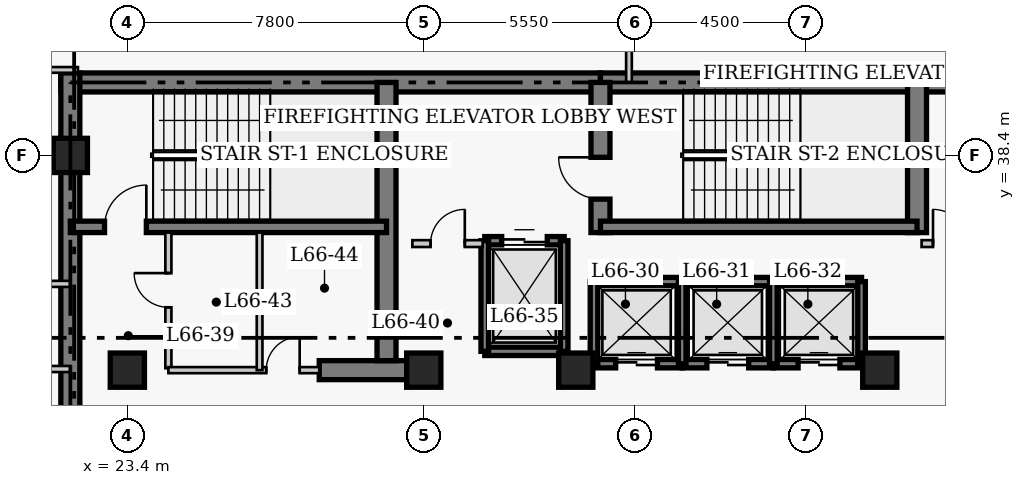
"""IFC4 building model, lengths in metres.
Left out: names, types, materials, properties, quantities, classifications, styles, units other than length and angle.
Written with IfcOpenShell. Run it as: python <this file> out.ifc"""

import sys

from ifc_helpers import new_model, si_unit, direction, frame, frame_2d, origin, origin_2d, place, context, subcontext, project, spatial, rectangle, extrude, element, fill, save


model = new_model("IFC4")
c1 = context("Model", 3, precision=1e-05, world=origin(), true_north=direction((0.0, 1.0)))
c2 = subcontext(c1, "Body", "Model", "MODEL_VIEW")
j1 = project(units=[si_unit("LENGTHUNIT", "METRE"), si_unit("PLANEANGLEUNIT", "RADIAN")], contexts=[c1])
p1 = place(None, origin())
s1 = spatial("IfcSite", under=j1, at=p1, CompositionType="ELEMENT")
p2 = place(p1, origin())
s2 = spatial("IfcBuilding", under=s1, at=p2, CompositionType="ELEMENT")
p3 = place(p2, frame((0.0, 0.0, 265.4)))
s3 = spatial("IfcBuildingStorey", under=s2, at=p3, CompositionType="ELEMENT", Elevation=265.4)
p4 = place(p3, frame((21.65, 40.32, 0.0), z_axis=(0.0, 0.0, 1.0), x_axis=(1.0, 0.0, 0.0)))
e1 = element("IfcWall", 1, at=p4, inside=s3, PredefinedType="SHEAR", context=c2, shape_type="SweptSolid", body=[
    extrude(rectangle(XDim=14.2, YDim=0.5, at=frame_2d((7.1, 0.0))), origin(), (0.0, 0.0, 1.0), 4.0),
])
p5 = place(p3, frame((35.85, 40.32, 0.0), z_axis=(0.0, 0.0, 1.0), x_axis=(1.0, 0.0, 0.0)))
e2 = element("IfcWall", 2, at=p5, inside=s3, PredefinedType="SHEAR", context=c2, shape_type="SweptSolid", body=[
    extrude(rectangle(XDim=12.6, YDim=0.5, at=frame_2d((6.3, 0.0))), origin(), (0.0, 0.0, 1.0), 4.0),
])
p6 = place(p3, frame((21.9, 27.05, 0.0), z_axis=(0.0, 0.0, 1.0), x_axis=(0.0, 1.0, 0.0)))
e3 = element("IfcWall", 3, at=p6, inside=s3, PredefinedType="SHEAR", context=c2, shape_type="SweptSolid", body=[
    extrude(rectangle(XDim=13.52, YDim=0.5, at=frame_2d((6.76, 0.0))), origin(), (0.0, 0.0, 1.0), 4.0),
])
p7 = place(p3, frame((28.45, 32.75, 0.0), z_axis=(0.0, 0.0, 1.0), x_axis=(1.0, 0.0, 0.0)))
e4 = element("IfcWall", 4, at=p7, inside=s3, PredefinedType="SHEAR", context=c2, shape_type="SweptSolid", body=[
    extrude(rectangle(XDim=2.4, YDim=0.5, at=frame_2d((1.2, 0.0))), origin(), (0.0, 0.0, 1.0), 4.0),
])
p8 = place(p3, frame((30.22, 33.0, 0.0), z_axis=(0.0, 0.0, 1.0), x_axis=(0.0, 1.0, 0.0)))
e5 = element("IfcWall", 5, at=p8, inside=s3, PredefinedType="SHEAR", context=c2, shape_type="SweptSolid", body=[
    extrude(rectangle(XDim=7.32, YDim=0.5, at=frame_2d((3.66, 0.0))), origin(), (0.0, 0.0, 1.0), 4.0),
])
p9 = place(p3, frame((35.85, 36.37, 0.0), z_axis=(0.0, 0.0, 1.0), x_axis=(0.0, 1.0, 0.0)))
e6 = element("IfcWall", 6, at=p9, inside=s3, PredefinedType="SHEAR", context=c2, shape_type="SweptSolid", body=[
    extrude(rectangle(XDim=3.95, YDim=0.5, at=frame_2d((1.975, 0.0))), origin(), (0.0, 0.0, 1.0), 4.0),
])
p10 = place(p9, frame((0.88, 0.0, 0.0)))
e7 = element("IfcOpeningElement", 7, at=p10, cuts=e6, PredefinedType="OPENING", context=c2, shape_type="SweptSolid", body=[
    extrude(rectangle(XDim=1.1, YDim=2.15, at=frame_2d((0.55, 1.075))), frame((0.0, 0.26, 0.0), z_axis=(0.0, -1.0, 0.0), x_axis=(1.0, 0.0, 0.0)), (0.0, 0.0, 1.0), 0.52),
])
p11 = place(p3, frame((44.18, 36.37, 0.0), z_axis=(0.0, 0.0, 1.0), x_axis=(0.0, 1.0, 0.0)))
e8 = element("IfcWall", 8, at=p11, inside=s3, PredefinedType="SHEAR", context=c2, shape_type="SweptSolid", body=[
    extrude(rectangle(XDim=3.95, YDim=0.5, at=frame_2d((1.975, 0.0))), origin(), (0.0, 0.0, 1.0), 4.0),
])
p12 = place(p3, frame((21.9, 36.52, 0.0), z_axis=(0.0, 0.0, 1.0), x_axis=(1.0, 0.0, 0.0)))
e9 = element("IfcWall", 9, at=p12, inside=s3, PredefinedType="SHEAR", context=c2, shape_type="SweptSolid", body=[
    extrude(rectangle(XDim=8.32, YDim=0.3, at=frame_2d((4.16, 0.0))), origin(), (0.0, 0.0, 1.0), 4.0),
])
p13 = place(p12, frame((0.9, 0.0, 0.0)))
e10 = element("IfcOpeningElement", 10, at=p13, cuts=e9, PredefinedType="OPENING", context=c2, shape_type="SweptSolid", body=[
    extrude(rectangle(XDim=1.1, YDim=2.15, at=frame_2d((0.55, 1.075))), frame((0.0, 0.16, 0.0), z_axis=(0.0, -1.0, 0.0), x_axis=(1.0, 0.0, 0.0)), (0.0, 0.0, 1.0), 0.32),
])
p14 = place(p3, frame((35.85, 36.52, 0.0), z_axis=(0.0, 0.0, 1.0), x_axis=(1.0, 0.0, 0.0)))
e11 = element("IfcWall", 11, at=p14, inside=s3, PredefinedType="SHEAR", context=c2, shape_type="SweptSolid", body=[
    extrude(rectangle(XDim=8.33, YDim=0.3, at=frame_2d((4.165, 0.0))), origin(), (0.0, 0.0, 1.0), 4.0),
])
for number, where, z_axis, x_axis in (
    (12, (21.9, 38.4, 0.0), (0.0, 0.0, 1.0), (1.0, 0.0, 0.0)),
    (13, (23.4, 32.75, 0.0), (0.0, 0.0, 1.0), (1.0, 0.0, 0.0)),
    (14, (31.2, 32.75, 0.0), (0.0, 0.0, 1.0), (1.0, 0.0, 0.0)),
    (15, (35.2, 32.75, 0.0), (0.0, 0.0, 1.0), (1.0, 0.0, 0.0)),
    (16, (43.2, 32.75, 0.0), (0.0, 0.0, 1.0), (1.0, 0.0, 0.0)),
):
    element("IfcColumn", number, at=place(p3, frame(where, z_axis=z_axis, x_axis=x_axis)), inside=s3, PredefinedType="COLUMN", context=c2, shape_type="SweptSolid", body=[
        extrude(rectangle(XDim=0.9, YDim=0.9, at=origin_2d()), origin(), (0.0, 0.0, 1.0), 4.0),
    ])
p15 = place(p3, frame((35.68, 35.08, 0.0), z_axis=(0.0, 0.0, 1.0), x_axis=(1.0, 0.0, 0.0)))
e17 = element("IfcWall", 17, at=p15, inside=s3, PredefinedType="SHEAR", context=c2, shape_type="SweptSolid", body=[
    extrude(rectangle(XDim=2.32, YDim=0.22, at=frame_2d((1.16, 0.0))), origin(), (0.0, 0.0, 1.0), 4.0),
])
p16 = place(p3, frame((35.68, 32.92, 0.0), z_axis=(0.0, 0.0, 1.0), x_axis=(1.0, 0.0, 0.0)))
e18 = element("IfcWall", 18, at=p16, inside=s3, PredefinedType="SHEAR", context=c2, shape_type="SweptSolid", body=[
    extrude(rectangle(XDim=2.32, YDim=0.22, at=frame_2d((1.16, 0.0))), origin(), (0.0, 0.0, 1.0), 4.0),
])
p17 = place(p16, frame((0.57, 0.0, 0.0)))
e19 = element("IfcOpeningElement", 19, at=p17, cuts=e18, PredefinedType="OPENING", context=c2, shape_type="SweptSolid", body=[
    extrude(rectangle(XDim=1.1, YDim=2.15, at=frame_2d((0.55, 1.075))), frame((0.0, 0.12, 0.0), z_axis=(0.0, -1.0, 0.0), x_axis=(1.0, 0.0, 0.0)), (0.0, 0.0, 1.0), 0.24),
])
p18 = place(p3, frame((35.68, 32.92, 0.0), z_axis=(0.0, 0.0, 1.0), x_axis=(0.0, 1.0, 0.0)))
e20 = element("IfcWall", 20, at=p18, inside=s3, PredefinedType="SHEAR", context=c2, shape_type="SweptSolid", body=[
    extrude(rectangle(XDim=2.16, YDim=0.2, at=frame_2d((1.08, 0.0))), origin(), (0.0, 0.0, 1.0), 4.0),
])
p19 = place(p3, frame((38.0, 35.08, 0.0), z_axis=(0.0, 0.0, 1.0), x_axis=(1.0, 0.0, 0.0)))
e21 = element("IfcWall", 21, at=p19, inside=s3, PredefinedType="SHEAR", context=c2, shape_type="SweptSolid", body=[
    extrude(rectangle(XDim=2.4, YDim=0.22, at=frame_2d((1.2, 0.0))), origin(), (0.0, 0.0, 1.0), 4.0),
])
p20 = place(p3, frame((38.0, 32.92, 0.0), z_axis=(0.0, 0.0, 1.0), x_axis=(1.0, 0.0, 0.0)))
e22 = element("IfcWall", 22, at=p20, inside=s3, PredefinedType="SHEAR", context=c2, shape_type="SweptSolid", body=[
    extrude(rectangle(XDim=2.4, YDim=0.22, at=frame_2d((1.2, 0.0))), origin(), (0.0, 0.0, 1.0), 4.0),
])
p21 = place(p20, frame((0.65, 0.0, 0.0)))
e23 = element("IfcOpeningElement", 23, at=p21, cuts=e22, PredefinedType="OPENING", context=c2, shape_type="SweptSolid", body=[
    extrude(rectangle(XDim=1.1, YDim=2.15, at=frame_2d((0.55, 1.075))), frame((0.0, 0.12, 0.0), z_axis=(0.0, -1.0, 0.0), x_axis=(1.0, 0.0, 0.0)), (0.0, 0.0, 1.0), 0.24),
])
p22 = place(p3, frame((38.0, 32.92, 0.0), z_axis=(0.0, 0.0, 1.0), x_axis=(0.0, 1.0, 0.0)))
e24 = element("IfcWall", 24, at=p22, inside=s3, PredefinedType="SHEAR", context=c2, shape_type="SweptSolid", body=[
    extrude(rectangle(XDim=2.16, YDim=0.2, at=frame_2d((1.08, 0.0))), origin(), (0.0, 0.0, 1.0), 4.0),
])
p23 = place(p3, frame((40.4, 35.08, 0.0), z_axis=(0.0, 0.0, 1.0), x_axis=(1.0, 0.0, 0.0)))
e25 = element("IfcWall", 25, at=p23, inside=s3, PredefinedType="SHEAR", context=c2, shape_type="SweptSolid", body=[
    extrude(rectangle(XDim=2.32, YDim=0.22, at=frame_2d((1.16, 0.0))), origin(), (0.0, 0.0, 1.0), 4.0),
])
p24 = place(p3, frame((40.4, 32.92, 0.0), z_axis=(0.0, 0.0, 1.0), x_axis=(1.0, 0.0, 0.0)))
e26 = element("IfcWall", 26, at=p24, inside=s3, PredefinedType="SHEAR", context=c2, shape_type="SweptSolid", body=[
    extrude(rectangle(XDim=2.32, YDim=0.22, at=frame_2d((1.16, 0.0))), origin(), (0.0, 0.0, 1.0), 4.0),
])
p25 = place(p24, frame((0.65, 0.0, 0.0)))
e27 = element("IfcOpeningElement", 27, at=p25, cuts=e26, PredefinedType="OPENING", context=c2, shape_type="SweptSolid", body=[
    extrude(rectangle(XDim=1.1, YDim=2.15, at=frame_2d((0.55, 1.075))), frame((0.0, 0.12, 0.0), z_axis=(0.0, -1.0, 0.0), x_axis=(1.0, 0.0, 0.0)), (0.0, 0.0, 1.0), 0.24),
])
for number, where, z_axis, x_axis in (
    (28, (40.4, 32.92, 0.0), (0.0, 0.0, 1.0), (0.0, 1.0, 0.0)),
    (29, (42.72, 32.92, 0.0), (0.0, 0.0, 1.0), (0.0, 1.0, 0.0)),
):
    element("IfcWall", number, at=place(p3, frame(where, z_axis=z_axis, x_axis=x_axis)), inside=s3, PredefinedType="SHEAR", context=c2, shape_type="SweptSolid", body=[
        extrude(rectangle(XDim=2.16, YDim=0.2, at=frame_2d((1.08, 0.0))), origin(), (0.0, 0.0, 1.0), 4.0),
    ])
p26 = place(p3, frame((32.805, 36.155, 0.0), z_axis=(0.0, 0.0, 1.0), x_axis=(1.0, 0.0, 0.0)))
e30 = element("IfcWall", 30, at=p26, inside=s3, PredefinedType="SHEAR", context=c2, shape_type="SweptSolid", body=[
    extrude(rectangle(XDim=2.09, YDim=0.22, at=frame_2d((1.045, 0.0))), origin(), (0.0, 0.0, 1.0), 4.0),
])
p27 = place(p26, frame((0.445, 0.0, 0.0)))
e31 = element("IfcOpeningElement", 31, at=p27, cuts=e30, PredefinedType="OPENING", context=c2, shape_type="SweptSolid", body=[
    extrude(rectangle(XDim=1.2, YDim=2.15, at=frame_2d((0.6, 1.075))), frame((0.0, 0.12, 0.0), z_axis=(0.0, -1.0, 0.0), x_axis=(1.0, 0.0, 0.0)), (0.0, 0.0, 1.0), 0.24),
])
p28 = place(p3, frame((32.805, 33.245, 0.0), z_axis=(0.0, 0.0, 1.0), x_axis=(1.0, 0.0, 0.0)))
e32 = element("IfcWall", 32, at=p28, inside=s3, PredefinedType="SHEAR", context=c2, shape_type="SweptSolid", body=[
    extrude(rectangle(XDim=2.09, YDim=0.22, at=frame_2d((1.045, 0.0))), origin(), (0.0, 0.0, 1.0), 4.0),
])
for number, where, z_axis, x_axis in (
    (33, (32.805, 33.245, 0.0), (0.0, 0.0, 1.0), (0.0, 1.0, 0.0)),
    (34, (34.895, 33.245, 0.0), (0.0, 0.0, 1.0), (0.0, 1.0, 0.0)),
):
    element("IfcWall", number, at=place(p3, frame(where, z_axis=z_axis, x_axis=x_axis)), inside=s3, PredefinedType="SHEAR", context=c2, shape_type="SweptSolid", body=[
        extrude(rectangle(XDim=2.91, YDim=0.2, at=frame_2d((1.455, 0.0))), origin(), (0.0, 0.0, 1.0), 4.0),
    ])
p29 = place(p3, frame((30.9, 36.08, 0.0), z_axis=(0.0, 0.0, 1.0), x_axis=(1.0, 0.0, 0.0)))
e35 = element("IfcWall", 35, at=p29, inside=s3, PredefinedType="PARTITIONING", context=c2, shape_type="SweptSolid", body=[
    extrude(rectangle(XDim=1.85, YDim=0.18, at=frame_2d((0.925, 0.0))), origin(), (0.0, 0.0, 1.0), 3.76),
])
p30 = place(p29, frame((0.48, 0.0, 0.0)))
e36 = element("IfcOpeningElement", 36, at=p30, cuts=e35, PredefinedType="OPENING", context=c2, shape_type="SweptSolid", body=[
    extrude(rectangle(XDim=0.9, YDim=2.15, at=frame_2d((0.45, 1.075))), frame((0.0, 0.1, 0.0), z_axis=(0.0, -1.0, 0.0), x_axis=(1.0, 0.0, 0.0)), (0.0, 0.0, 1.0), 0.2),
])
p31 = place(p3, frame((44.3, 36.08, 0.0), z_axis=(0.0, 0.0, 1.0), x_axis=(1.0, 0.0, 0.0)))
e37 = element("IfcWall", 37, at=p31, inside=s3, PredefinedType="PARTITIONING", context=c2, shape_type="SweptSolid", body=[
    extrude(rectangle(XDim=1.5, YDim=0.18, at=frame_2d((0.75, 0.0))), origin(), (0.0, 0.0, 1.0), 3.76),
])
p32 = place(p31, frame((0.3, 0.0, 0.0)))
e38 = element("IfcOpeningElement", 38, at=p32, cuts=e37, PredefinedType="OPENING", context=c2, shape_type="SweptSolid", body=[
    extrude(rectangle(XDim=0.9, YDim=2.15, at=frame_2d((0.45, 1.075))), frame((0.0, 0.1, 0.0), z_axis=(0.0, -1.0, 0.0), x_axis=(1.0, 0.0, 0.0)), (0.0, 0.0, 1.0), 0.2),
])
p33 = place(p3, frame((24.48, 32.8, 0.0), z_axis=(0.0, 0.0, 1.0), x_axis=(0.0, 1.0, 0.0)))
e39 = element("IfcWall", 39, at=p33, inside=s3, PredefinedType="PARTITIONING", context=c2, shape_type="SweptSolid", body=[
    extrude(rectangle(XDim=3.57, YDim=0.16, at=frame_2d((1.785, 0.0))), origin(), (0.0, 0.0, 1.0), 3.76),
])
p34 = place(p33, frame((1.604, 0.0, 0.0)))
e40 = element("IfcOpeningElement", 40, at=p34, cuts=e39, PredefinedType="OPENING", context=c2, shape_type="SweptSolid", body=[
    extrude(rectangle(XDim=0.9, YDim=2.1, at=frame_2d((0.45, 1.05))), frame((0.0, 0.09, 0.0), z_axis=(0.0, -1.0, 0.0), x_axis=(1.0, 0.0, 0.0)), (0.0, 0.0, 1.0), 0.18),
])
p35 = place(p3, frame((24.48, 32.75, 0.0), z_axis=(0.0, 0.0, 1.0), x_axis=(1.0, 0.0, 0.0)))
e41 = element("IfcWall", 41, at=p35, inside=s3, PredefinedType="PARTITIONING", context=c2, shape_type="SweptSolid", body=[
    extrude(rectangle(XDim=3.97, YDim=0.16, at=frame_2d((1.985, 0.0))), origin(), (0.0, 0.0, 1.0), 3.76),
])
p36 = place(p35, frame((2.575, 0.0, 0.0)))
e42 = element("IfcOpeningElement", 42, at=p36, cuts=e41, PredefinedType="OPENING", context=c2, shape_type="SweptSolid", body=[
    extrude(rectangle(XDim=0.88, YDim=2.05, at=frame_2d((0.44, 1.025))), frame((0.0, 0.09, 0.0), z_axis=(0.0, -1.0, 0.0), x_axis=(1.0, 0.0, 0.0)), (0.0, 0.0, 1.0), 0.18),
])
p37 = place(p3, frame((26.88, 32.75, 0.0), z_axis=(0.0, 0.0, 1.0), x_axis=(0.0, 1.0, 0.0)))
e43 = element("IfcWall", 43, at=p37, inside=s3, PredefinedType="PARTITIONING", context=c2, shape_type="SweptSolid", body=[
    extrude(rectangle(XDim=3.62, YDim=0.15, at=frame_2d((1.81, 0.0))), origin(), (0.0, 0.0, 1.0), 3.76),
])
for number, where, z_axis, x_axis in (
    (44, (20.46, 35.02, 0.0), (0.0, 0.0, 1.0), (1.0, 0.0, 0.0)),
    (45, (20.46, 32.78, 0.0), (0.0, 0.0, 1.0), (1.0, 0.0, 0.0)),
):
    element("IfcWall", number, at=place(p3, frame(where, z_axis=z_axis, x_axis=x_axis)), inside=s3, PredefinedType="PARTITIONING", context=c2, shape_type="SweptSolid", body=[
        extrude(rectangle(XDim=1.44, YDim=0.16, at=frame_2d((0.72, 0.0))), origin(), (0.0, 0.0, 1.0), 3.76),
    ])
p38 = place(p3, frame((18.24, 40.65, 0.0), z_axis=(0.0, 0.0, 1.0), x_axis=(1.0, 0.0, 0.0)))
e46 = element("IfcWall", 46, at=p38, inside=s3, PredefinedType="PARTITIONING", context=c2, shape_type="SweptSolid", body=[
    extrude(rectangle(XDim=3.86, YDim=0.15, at=frame_2d((1.93, 0.0))), origin(), (0.0, 0.0, 1.0), 3.76),
])
p39 = place(p38, frame((0.55, 0.0, 0.0)))
e47 = element("IfcOpeningElement", 47, at=p39, cuts=e46, PredefinedType="OPENING", context=c2, shape_type="SweptSolid", body=[
    extrude(rectangle(XDim=1.0, YDim=2.15, at=frame_2d((0.5, 1.075))), frame((0.0, 0.085, 0.0), z_axis=(0.0, -1.0, 0.0), x_axis=(1.0, 0.0, 0.0)), (0.0, 0.0, 1.0), 0.17),
])
p40 = place(p3, frame((36.6, 40.32, 0.0), z_axis=(0.0, 0.0, 1.0), x_axis=(0.0, 1.0, 0.0)))
e48 = element("IfcWall", 48, at=p40, inside=s3, PredefinedType="PARTITIONING", context=c2, shape_type="SweptSolid", body=[
    extrude(rectangle(XDim=3.545, YDim=0.15, at=frame_2d((1.772, 0.0))), origin(), (0.0, 0.0, 1.0), 3.76),
])
p41 = place(p17, origin())
e49 = element("IfcDoor", 49, at=p41, inside=s3, OperationType="DOUBLE_DOOR_SLIDING", PredefinedType="DOOR", context=c2, shape_type="SweptSolid", body=[
    extrude(rectangle(XDim=1.1, YDim=2.15, at=frame_2d((0.55, 1.075))), frame((0.0, 0.025, 0.0), z_axis=(0.0, -1.0, 0.0), x_axis=(1.0, 0.0, 0.0)), (0.0, 0.0, 1.0), 0.05),
])
fill(e19, e49)
p42 = place(p21, origin())
e50 = element("IfcDoor", 50, at=p42, inside=s3, OperationType="DOUBLE_DOOR_SLIDING", PredefinedType="DOOR", context=c2, shape_type="SweptSolid", body=[
    extrude(rectangle(XDim=1.1, YDim=2.15, at=frame_2d((0.55, 1.075))), frame((0.0, 0.025, 0.0), z_axis=(0.0, -1.0, 0.0), x_axis=(1.0, 0.0, 0.0)), (0.0, 0.0, 1.0), 0.05),
])
fill(e23, e50)
p43 = place(p25, origin())
e51 = element("IfcDoor", 51, at=p43, inside=s3, OperationType="DOUBLE_DOOR_SLIDING", PredefinedType="DOOR", context=c2, shape_type="SweptSolid", body=[
    extrude(rectangle(XDim=1.1, YDim=2.15, at=frame_2d((0.55, 1.075))), frame((0.0, 0.025, 0.0), z_axis=(0.0, -1.0, 0.0), x_axis=(1.0, 0.0, 0.0)), (0.0, 0.0, 1.0), 0.05),
])
fill(e27, e51)
p44 = place(p27, origin())
e52 = element("IfcDoor", 52, at=p44, inside=s3, OperationType="DOUBLE_DOOR_SLIDING", PredefinedType="DOOR", context=c2, shape_type="SweptSolid", body=[
    extrude(rectangle(XDim=1.2, YDim=2.15, at=frame_2d((0.6, 1.075))), frame((0.0, 0.025, 0.0), z_axis=(0.0, -1.0, 0.0), x_axis=(1.0, 0.0, 0.0)), (0.0, 0.0, 1.0), 0.05),
])
fill(e31, e52)
p45 = place(p30, origin())
e53 = element("IfcDoor", 53, at=p45, inside=s3, OperationType="SINGLE_SWING_RIGHT", PredefinedType="DOOR", context=c2, shape_type="SweptSolid", body=[
    extrude(rectangle(XDim=0.9, YDim=2.15, at=frame_2d((0.45, 1.075))), frame((0.0, 0.025, 0.0), z_axis=(0.0, -1.0, 0.0), x_axis=(1.0, 0.0, 0.0)), (0.0, 0.0, 1.0), 0.05),
])
fill(e36, e53)
p46 = place(p32, origin())
e54 = element("IfcDoor", 54, at=p46, inside=s3, OperationType="SINGLE_SWING_LEFT", PredefinedType="DOOR", context=c2, shape_type="SweptSolid", body=[
    extrude(rectangle(XDim=0.9, YDim=2.15, at=frame_2d((0.45, 1.075))), frame((0.0, 0.025, 0.0), z_axis=(0.0, -1.0, 0.0), x_axis=(1.0, 0.0, 0.0)), (0.0, 0.0, 1.0), 0.05),
])
fill(e38, e54)
p47 = place(p34, origin())
e55 = element("IfcDoor", 55, at=p47, inside=s3, OperationType="SINGLE_SWING_RIGHT", PredefinedType="DOOR", context=c2, shape_type="SweptSolid", body=[
    extrude(rectangle(XDim=0.9, YDim=2.1, at=frame_2d((0.45, 1.05))), frame((0.0, 0.025, 0.0), z_axis=(0.0, -1.0, 0.0), x_axis=(1.0, 0.0, 0.0)), (0.0, 0.0, 1.0), 0.05),
])
fill(e40, e55)
p48 = place(p36, origin())
e56 = element("IfcDoor", 56, at=p48, inside=s3, OperationType="SINGLE_SWING_RIGHT", PredefinedType="DOOR", context=c2, shape_type="SweptSolid", body=[
    extrude(rectangle(XDim=0.88, YDim=2.05, at=frame_2d((0.44, 1.025))), frame((0.0, 0.025, 0.0), z_axis=(0.0, -1.0, 0.0), x_axis=(1.0, 0.0, 0.0)), (0.0, 0.0, 1.0), 0.05),
])
fill(e42, e56)
p49 = place(p13, origin())
e57 = element("IfcDoor", 57, at=p49, inside=s3, OperationType="SINGLE_SWING_RIGHT", PredefinedType="DOOR", context=c2, shape_type="SweptSolid", body=[
    extrude(rectangle(XDim=1.1, YDim=2.15, at=frame_2d((0.55, 1.075))), frame((0.0, 0.025, 0.0), z_axis=(0.0, -1.0, 0.0), x_axis=(1.0, 0.0, 0.0)), (0.0, 0.0, 1.0), 0.05),
])
fill(e10, e57)
p50 = place(p10, origin())
e58 = element("IfcDoor", 58, at=p50, inside=s3, OperationType="SINGLE_SWING_RIGHT", PredefinedType="DOOR", context=c2, shape_type="SweptSolid", body=[
    extrude(rectangle(XDim=1.1, YDim=2.15, at=frame_2d((0.55, 1.075))), frame((0.0, 0.025, 0.0), z_axis=(0.0, -1.0, 0.0), x_axis=(1.0, 0.0, 0.0)), (0.0, 0.0, 1.0), 0.05),
])
fill(e7, e58)
save(model, sys.argv[1])
